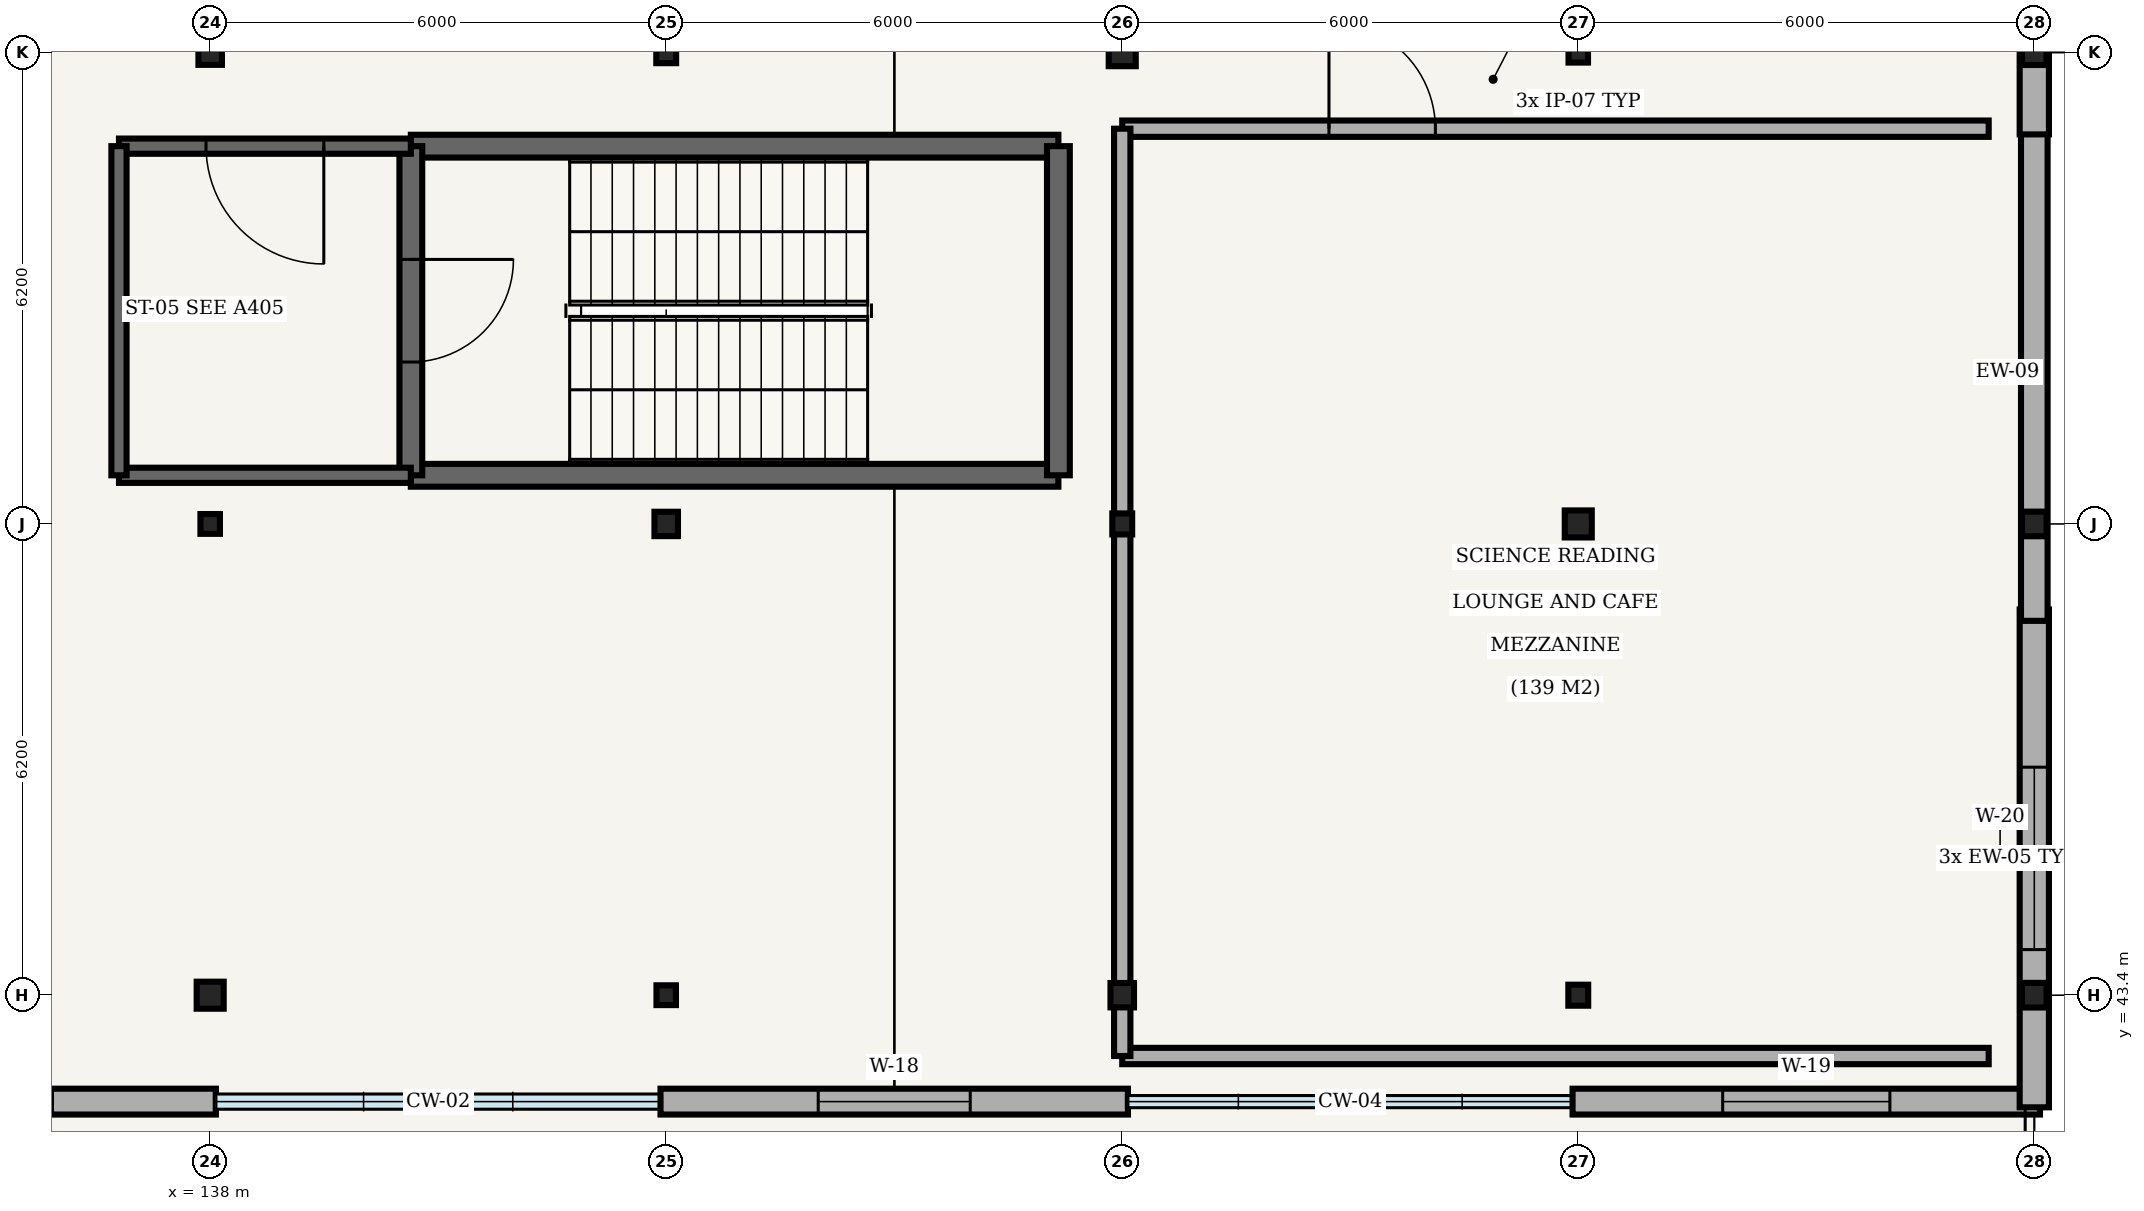
"""IFC4 building model, lengths in metres.
Left out: names, types, materials, properties, quantities, classifications, styles, units other than length and angle.
Written with IfcOpenShell. Run it as: python <this file> out.ifc"""

import sys

from ifc_helpers import new_model, si_unit, direction, frame, frame_2d, origin, origin_2d, place, context, subcontext, project, spatial, rectangle, hollow_circle, i_section, extrude, element, fill, save


model = new_model("IFC4")
c1 = context("Model", 3, precision=1e-05, world=origin(), true_north=direction((0.0, 1.0)))
c2 = subcontext(c1, "Body", "Model", "MODEL_VIEW")
j1 = project(units=[si_unit("LENGTHUNIT", "METRE"), si_unit("PLANEANGLEUNIT", "RADIAN")], contexts=[c1])
p1 = place(None, origin())
s1 = spatial("IfcSite", under=j1, at=p1, CompositionType="ELEMENT")
p2 = place(p1, origin())
s2 = spatial("IfcBuilding", under=s1, at=p2, CompositionType="ELEMENT")
p3 = place(p2, frame((0.0, 0.0, 5.4)))
s3 = spatial("IfcBuildingStorey", under=s2, at=p3, CompositionType="ELEMENT", Elevation=5.4)
p4 = place(p3, frame((138.0, 43.4, 0.0), z_axis=(0.0, 0.0, 1.0), x_axis=(1.0, 0.0, 0.0)))
e1 = element("IfcColumn", 1, at=p4, inside=s3, PredefinedType="COLUMN", context=c2, shape_type="SweptSolid", body=[
    extrude(hollow_circle(Radius=0.178, WallThickness=0.012, at=origin_2d()), origin(), (0.0, 0.0, 1.0), 5.4),
])
p5 = place(p3, frame((138.0, 49.6, 0.0), z_axis=(0.0, 0.0, 1.0), x_axis=(1.0, 0.0, 0.0)))
e2 = element("IfcColumn", 2, at=p5, inside=s3, PredefinedType="COLUMN", context=c2, shape_type="SweptSolid", body=[
    extrude(i_section(OverallWidth=0.256, OverallDepth=0.26, WebThickness=0.01, FlangeThickness=0.017, FilletRadius=0.013, at=origin_2d()), origin(), (0.0, 0.0, 1.0), 5.4),
])
p6 = place(p3, frame((138.0, 55.8, 0.0), z_axis=(0.0, 0.0, 1.0), x_axis=(1.0, 0.0, 0.0)))
e3 = element("IfcColumn", 3, at=p6, inside=s3, PredefinedType="COLUMN", context=c2, shape_type="SweptSolid", body=[
    extrude(i_section(OverallWidth=0.309, OverallDepth=0.321, WebThickness=0.014, FlangeThickness=0.022, FilletRadius=0.015, at=origin_2d()), origin(), (0.0, 0.0, 1.0), 5.4),
])
p7 = place(p3, frame((144.0, 43.4, 0.0), z_axis=(0.0, 0.0, 1.0), x_axis=(1.0, 0.0, 0.0)))
e4 = element("IfcColumn", 4, at=p7, inside=s3, PredefinedType="COLUMN", context=c2, shape_type="SweptSolid", body=[
    extrude(i_section(OverallWidth=0.256, OverallDepth=0.26, WebThickness=0.01, FlangeThickness=0.017, FilletRadius=0.013, at=origin_2d()), origin(), (0.0, 0.0, 1.0), 5.4),
])
p8 = place(p3, frame((144.0, 49.6, 0.0), z_axis=(0.0, 0.0, 1.0), x_axis=(1.0, 0.0, 0.0)))
e5 = element("IfcColumn", 5, at=p8, inside=s3, PredefinedType="COLUMN", context=c2, shape_type="SweptSolid", body=[
    extrude(i_section(OverallWidth=0.309, OverallDepth=0.321, WebThickness=0.014, FlangeThickness=0.022, FilletRadius=0.015, at=origin_2d()), origin(), (0.0, 0.0, 1.0), 5.4),
])
p9 = place(p3, frame((144.0, 55.8, 0.0), z_axis=(0.0, 0.0, 1.0), x_axis=(1.0, 0.0, 0.0)))
e6 = element("IfcColumn", 6, at=p9, inside=s3, PredefinedType="COLUMN", context=c2, shape_type="SweptSolid", body=[
    extrude(i_section(OverallWidth=0.261, OverallDepth=0.276, WebThickness=0.015, FlangeThickness=0.025, FilletRadius=0.013, at=origin_2d()), origin(), (0.0, 0.0, 1.0), 5.4),
])
p10 = place(p3, frame((150.0, 43.4, 0.0), z_axis=(0.0, 0.0, 1.0), x_axis=(1.0, 0.0, 0.0)))
e7 = element("IfcColumn", 7, at=p10, inside=s3, PredefinedType="COLUMN", context=c2, shape_type="SweptSolid", body=[
    extrude(i_section(OverallWidth=0.309, OverallDepth=0.321, WebThickness=0.014, FlangeThickness=0.022, FilletRadius=0.015, at=origin_2d()), origin(), (0.0, 0.0, 1.0), 5.4),
])
p11 = place(p3, frame((150.0, 49.6, 0.0), z_axis=(0.0, 0.0, 1.0), x_axis=(1.0, 0.0, 0.0)))
e8 = element("IfcColumn", 8, at=p11, inside=s3, PredefinedType="COLUMN", context=c2, shape_type="SweptSolid", body=[
    extrude(i_section(OverallWidth=0.261, OverallDepth=0.276, WebThickness=0.015, FlangeThickness=0.025, FilletRadius=0.013, at=origin_2d()), origin(), (0.0, 0.0, 1.0), 5.4),
])
p12 = place(p3, frame((150.0, 55.8, 0.0), z_axis=(0.0, 0.0, 1.0), x_axis=(1.0, 0.0, 0.0)))
e9 = element("IfcColumn", 9, at=p12, inside=s3, PredefinedType="COLUMN", context=c2, shape_type="SweptSolid", body=[
    extrude(hollow_circle(Radius=0.178, WallThickness=0.012, at=origin_2d()), origin(), (0.0, 0.0, 1.0), 5.4),
])
p13 = place(p3, frame((156.0, 43.4, 0.0), z_axis=(0.0, 0.0, 1.0), x_axis=(1.0, 0.0, 0.0)))
e10 = element("IfcColumn", 10, at=p13, inside=s3, PredefinedType="COLUMN", context=c2, shape_type="SweptSolid", body=[
    extrude(i_section(OverallWidth=0.261, OverallDepth=0.276, WebThickness=0.015, FlangeThickness=0.025, FilletRadius=0.013, at=origin_2d()), origin(), (0.0, 0.0, 1.0), 5.4),
])
p14 = place(p3, frame((156.0, 49.6, 0.0), z_axis=(0.0, 0.0, 1.0), x_axis=(1.0, 0.0, 0.0)))
e11 = element("IfcColumn", 11, at=p14, inside=s3, PredefinedType="COLUMN", context=c2, shape_type="SweptSolid", body=[
    extrude(hollow_circle(Radius=0.178, WallThickness=0.012, at=origin_2d()), origin(), (0.0, 0.0, 1.0), 5.4),
])
p15 = place(p3, frame((156.0, 55.8, 0.0), z_axis=(0.0, 0.0, 1.0), x_axis=(1.0, 0.0, 0.0)))
e12 = element("IfcColumn", 12, at=p15, inside=s3, PredefinedType="COLUMN", context=c2, shape_type="SweptSolid", body=[
    extrude(i_section(OverallWidth=0.256, OverallDepth=0.26, WebThickness=0.01, FlangeThickness=0.017, FilletRadius=0.013, at=origin_2d()), origin(), (0.0, 0.0, 1.0), 5.4),
])
for number, where, z_axis, x_axis in (
    (13, (162.0, 43.4, 0.0), (0.0, 0.0, 1.0), (1.0, 0.0, 0.0)),
    (14, (162.0, 49.6, 0.0), (0.0, 0.0, 1.0), (1.0, 0.0, 0.0)),
    (15, (162.0, 55.8, 0.0), (0.0, 0.0, 1.0), (1.0, 0.0, 0.0)),
):
    element("IfcColumn", number, at=place(p3, frame(where, z_axis=z_axis, x_axis=x_axis)), inside=s3, PredefinedType="COLUMN", context=c2, shape_type="SweptSolid", body=[
        extrude(hollow_circle(Radius=0.162, WallThickness=0.012, at=origin_2d()), origin(), (0.0, 0.0, 1.0), 5.4),
    ])
p16 = place(p3, frame((131.925, 42.0, 0.0), z_axis=(0.0, 0.0, 1.0), x_axis=(1.0, 0.0, 0.0)))
e16 = element("IfcWall", 16, at=p16, inside=s3, PredefinedType="SOLIDWALL", context=c2, shape_type="SweptSolid", body=[
    extrude(rectangle(XDim=6.15, YDim=0.34, at=frame_2d((3.075, 0.0))), origin(), (0.0, 0.0, 1.0), 4.44),
])
p17 = place(p16, frame((2.15, 0.0, 0.9)))
e17 = element("IfcOpeningElement", 17, at=p17, cuts=e16, PredefinedType="OPENING", context=c2, shape_type="SweptSolid", body=[
    extrude(rectangle(XDim=1.85, YDim=1.5, at=frame_2d((0.925, 0.75))), frame((0.0, 0.18, 0.0), z_axis=(0.0, -1.0, 0.0), x_axis=(1.0, 0.0, 0.0)), (0.0, 0.0, 1.0), 0.36),
])
p18 = place(p3, frame((143.925, 42.0, 0.0), z_axis=(0.0, 0.0, 1.0), x_axis=(1.0, 0.0, 0.0)))
e18 = element("IfcWall", 18, at=p18, inside=s3, PredefinedType="SOLIDWALL", context=c2, shape_type="SweptSolid", body=[
    extrude(rectangle(XDim=6.15, YDim=0.34, at=frame_2d((3.075, 0.0))), origin(), (0.0, 0.0, 1.0), 4.44),
])
p19 = place(p18, frame((2.075, 0.0, 0.9)))
e19 = element("IfcOpeningElement", 19, at=p19, cuts=e18, PredefinedType="OPENING", context=c2, shape_type="SweptSolid", body=[
    extrude(rectangle(XDim=2.0, YDim=1.5, at=frame_2d((1.0, 0.75))), frame((0.0, 0.18, 0.0), z_axis=(0.0, -1.0, 0.0), x_axis=(1.0, 0.0, 0.0)), (0.0, 0.0, 1.0), 0.36),
])
p20 = place(p3, frame((155.925, 42.0, 0.0), z_axis=(0.0, 0.0, 1.0), x_axis=(1.0, 0.0, 0.0)))
e20 = element("IfcWall", 20, at=p20, inside=s3, PredefinedType="SOLIDWALL", context=c2, shape_type="SweptSolid", body=[
    extrude(rectangle(XDim=6.15, YDim=0.34, at=frame_2d((3.075, 0.0))), origin(), (0.0, 0.0, 1.0), 4.44),
])
p21 = place(p20, frame((1.975, 0.0, 0.9)))
e21 = element("IfcOpeningElement", 21, at=p21, cuts=e20, PredefinedType="OPENING", context=c2, shape_type="SweptSolid", body=[
    extrude(rectangle(XDim=2.2, YDim=1.5, at=frame_2d((1.1, 0.75))), frame((0.0, 0.18, 0.0), z_axis=(0.0, -1.0, 0.0), x_axis=(1.0, 0.0, 0.0)), (0.0, 0.0, 1.0), 0.36),
])
p22 = place(p3, frame((162.0, 41.925, 0.0), z_axis=(0.0, 0.0, 1.0), x_axis=(0.0, 1.0, 0.0)))
e22 = element("IfcWall", 22, at=p22, inside=s3, PredefinedType="SOLIDWALL", context=c2, shape_type="SweptSolid", body=[
    extrude(rectangle(XDim=6.55, YDim=0.385, at=frame_2d((3.275, 0.0))), origin(), (0.0, 0.0, 1.0), 4.44),
])
p23 = place(p22, frame((2.075, 0.0, 0.9)))
e23 = element("IfcOpeningElement", 23, at=p23, cuts=e22, PredefinedType="OPENING", context=c2, shape_type="SweptSolid", body=[
    extrude(rectangle(XDim=2.4, YDim=1.5, at=frame_2d((1.2, 0.75))), frame((0.0, 0.202, 0.0), z_axis=(0.0, -1.0, 0.0), x_axis=(1.0, 0.0, 0.0)), (0.0, 0.0, 1.0), 0.405),
])
p24 = place(p3, frame((162.0, 48.325, 0.0), z_axis=(0.0, 0.0, 1.0), x_axis=(0.0, 1.0, 0.0)))
e24 = element("IfcWall", 24, at=p24, inside=s3, PredefinedType="SOLIDWALL", context=c2, shape_type="SweptSolid", body=[
    extrude(rectangle(XDim=6.55, YDim=0.35, at=frame_2d((3.275, 0.0))), origin(), (0.0, 0.0, 1.0), 4.44),
])
p25 = place(p3, frame((162.0, 54.725, 0.0), z_axis=(0.0, 0.0, 1.0), x_axis=(0.0, 1.0, 0.0)))
e25 = element("IfcWall", 25, at=p25, inside=s3, PredefinedType="SOLIDWALL", context=c2, shape_type="SweptSolid", body=[
    extrude(rectangle(XDim=6.55, YDim=0.385, at=frame_2d((3.275, 0.0))), origin(), (0.0, 0.0, 1.0), 4.44),
])
p26 = place(p25, frame((1.975, 0.0, 0.9)))
e26 = element("IfcOpeningElement", 26, at=p26, cuts=e25, PredefinedType="OPENING", context=c2, shape_type="SweptSolid", body=[
    extrude(rectangle(XDim=2.6, YDim=1.5, at=frame_2d((1.3, 0.75))), frame((0.0, 0.202, 0.0), z_axis=(0.0, -1.0, 0.0), x_axis=(1.0, 0.0, 0.0)), (0.0, 0.0, 1.0), 0.405),
])
for number, where, z_axis, x_axis in (
    (27, (140.64, 50.24, 0.0), (0.0, 0.0, 1.0), (1.0, 0.0, 0.0)),
    (28, (149.16, 54.57, 0.0), (0.0, 0.0, 1.0), (-1.0, 0.0, 0.0)),
):
    element("IfcWall", number, at=place(p3, frame(where, z_axis=z_axis, x_axis=x_axis)), inside=s3, PredefinedType="SHEAR", context=c2, shape_type="SweptSolid", body=[
        extrude(rectangle(XDim=8.52, YDim=0.3, at=frame_2d((4.26, 0.0))), origin(), (0.0, 0.0, 1.0), 5.15),
    ])
p27 = place(p3, frame((140.64, 54.57, 0.0), z_axis=(0.0, 0.0, 1.0), x_axis=(0.0, -1.0, 0.0)))
e29 = element("IfcWall", 29, at=p27, inside=s3, PredefinedType="SHEAR", context=c2, shape_type="SweptSolid", body=[
    extrude(rectangle(XDim=4.33, YDim=0.3, at=frame_2d((2.165, 0.0))), origin(), (0.0, 0.0, 1.0), 5.15),
])
p28 = place(p27, frame((1.49, 0.0, 0.0)))
e30 = element("IfcOpeningElement", 30, at=p28, cuts=e29, PredefinedType="OPENING", context=c2, shape_type="SweptSolid", body=[
    extrude(rectangle(XDim=1.35, YDim=2.2, at=frame_2d((0.675, 1.1))), frame((0.0, 0.16, 0.0), z_axis=(0.0, -1.0, 0.0), x_axis=(1.0, 0.0, 0.0)), (0.0, 0.0, 1.0), 0.32),
])
p29 = place(p3, frame((149.16, 50.24, 0.0), z_axis=(0.0, 0.0, 1.0), x_axis=(0.0, 1.0, 0.0)))
e31 = element("IfcWall", 31, at=p29, inside=s3, PredefinedType="SHEAR", context=c2, shape_type="SweptSolid", body=[
    extrude(rectangle(XDim=4.33, YDim=0.3, at=frame_2d((2.165, 0.0))), origin(), (0.0, 0.0, 1.0), 5.15),
])
p30 = place(p3, frame((136.8, 50.24, 0.0), z_axis=(0.0, 0.0, 1.0), x_axis=(1.0, 0.0, 0.0)))
e32 = element("IfcWall", 32, at=p30, inside=s3, PredefinedType="SHEAR", context=c2, shape_type="SweptSolid", body=[
    extrude(rectangle(XDim=3.84, YDim=0.2, at=frame_2d((1.92, 0.0))), origin(), (0.0, 0.0, 1.0), 5.15),
])
p31 = place(p3, frame((140.64, 54.57, 0.0), z_axis=(0.0, 0.0, 1.0), x_axis=(-1.0, 0.0, 0.0)))
e33 = element("IfcWall", 33, at=p31, inside=s3, PredefinedType="SHEAR", context=c2, shape_type="SweptSolid", body=[
    extrude(rectangle(XDim=3.84, YDim=0.2, at=frame_2d((1.92, 0.0))), origin(), (0.0, 0.0, 1.0), 5.15),
])
p32 = place(p31, frame((1.145, 0.0, 0.0)))
e34 = element("IfcOpeningElement", 34, at=p32, cuts=e33, PredefinedType="OPENING", context=c2, shape_type="SweptSolid", body=[
    extrude(rectangle(XDim=1.55, YDim=2.2, at=frame_2d((0.775, 1.1))), frame((0.0, 0.11, 0.0), z_axis=(0.0, -1.0, 0.0), x_axis=(1.0, 0.0, 0.0)), (0.0, 0.0, 1.0), 0.22),
])
p33 = place(p3, frame((136.8, 54.57, 0.0), z_axis=(0.0, 0.0, 1.0), x_axis=(0.0, -1.0, 0.0)))
e35 = element("IfcWall", 35, at=p33, inside=s3, PredefinedType="SHEAR", context=c2, shape_type="SweptSolid", body=[
    extrude(rectangle(XDim=4.33, YDim=0.2, at=frame_2d((2.165, 0.0))), origin(), (0.0, 0.0, 1.0), 5.15),
])
p34 = place(p3, frame((150.0, 54.8, 0.0), z_axis=(0.0, 0.0, 1.0), x_axis=(1.0, 0.0, 0.0)))
e36 = element("IfcWall", 36, at=p34, inside=s3, PredefinedType="PARTITIONING", context=c2, shape_type="SweptSolid", body=[
    extrude(rectangle(XDim=11.4, YDim=0.215, at=frame_2d((5.7, 0.0))), origin(), (0.0, 0.0, 1.0), 4.35),
])
p35 = place(p34, frame((2.72, 0.0, 0.0)))
e37 = element("IfcOpeningElement", 37, at=p35, cuts=e36, PredefinedType="OPENING", context=c2, shape_type="SweptSolid", body=[
    extrude(rectangle(XDim=1.4, YDim=2.25, at=frame_2d((0.7, 1.125))), frame((0.0, 0.117, 0.0), z_axis=(0.0, -1.0, 0.0), x_axis=(1.0, 0.0, 0.0)), (0.0, 0.0, 1.0), 0.235),
])
p36 = place(p3, frame((161.4, 42.6, 0.0), z_axis=(0.0, 0.0, 1.0), x_axis=(-1.0, 0.0, 0.0)))
e38 = element("IfcWall", 38, at=p36, inside=s3, PredefinedType="PARTITIONING", context=c2, shape_type="SweptSolid", body=[
    extrude(rectangle(XDim=11.4, YDim=0.215, at=frame_2d((5.7, 0.0))), origin(), (0.0, 0.0, 1.0), 4.35),
])
p37 = place(p3, frame((150.0, 42.6, 0.0), z_axis=(0.0, 0.0, 1.0), x_axis=(0.0, 1.0, 0.0)))
e39 = element("IfcWall", 39, at=p37, inside=s3, PredefinedType="PARTITIONING", context=c2, shape_type="SweptSolid", body=[
    extrude(rectangle(XDim=12.2, YDim=0.215, at=frame_2d((6.1, 0.0))), origin(), (0.0, 0.0, 1.0), 4.35),
])
p38 = place(p17, origin())
e40 = element("IfcWindow", 40, at=p38, inside=s3, PartitioningType="DOUBLE_PANEL_VERTICAL", PredefinedType="WINDOW", context=c2, shape_type="SweptSolid", body=[
    extrude(rectangle(XDim=1.85, YDim=1.5, at=frame_2d((0.925, 0.75))), frame((0.0, 0.03, 0.0), z_axis=(0.0, -1.0, 0.0), x_axis=(1.0, 0.0, 0.0)), (0.0, 0.0, 1.0), 0.06),
])
fill(e17, e40)
p39 = place(p19, origin())
e41 = element("IfcWindow", 41, at=p39, inside=s3, PartitioningType="DOUBLE_PANEL_VERTICAL", PredefinedType="WINDOW", context=c2, shape_type="SweptSolid", body=[
    extrude(rectangle(XDim=2.0, YDim=1.5, at=frame_2d((1.0, 0.75))), frame((0.0, 0.03, 0.0), z_axis=(0.0, -1.0, 0.0), x_axis=(1.0, 0.0, 0.0)), (0.0, 0.0, 1.0), 0.06),
])
fill(e19, e41)
p40 = place(p21, origin())
e42 = element("IfcWindow", 42, at=p40, inside=s3, PartitioningType="DOUBLE_PANEL_VERTICAL", PredefinedType="WINDOW", context=c2, shape_type="SweptSolid", body=[
    extrude(rectangle(XDim=2.2, YDim=1.5, at=frame_2d((1.1, 0.75))), frame((0.0, 0.03, 0.0), z_axis=(0.0, -1.0, 0.0), x_axis=(1.0, 0.0, 0.0)), (0.0, 0.0, 1.0), 0.06),
])
fill(e21, e42)
p41 = place(p23, origin())
e43 = element("IfcWindow", 43, at=p41, inside=s3, PartitioningType="DOUBLE_PANEL_VERTICAL", PredefinedType="WINDOW", context=c2, shape_type="SweptSolid", body=[
    extrude(rectangle(XDim=2.4, YDim=1.5, at=frame_2d((1.2, 0.75))), frame((0.0, 0.03, 0.0), z_axis=(0.0, -1.0, 0.0), x_axis=(1.0, 0.0, 0.0)), (0.0, 0.0, 1.0), 0.06),
])
fill(e23, e43)
p42 = place(p28, origin())
e44 = element("IfcDoor", 44, at=p42, inside=s3, OperationType="SINGLE_SWING_LEFT", PredefinedType="DOOR", context=c2, shape_type="SweptSolid", body=[
    extrude(rectangle(XDim=1.35, YDim=2.2, at=frame_2d((0.675, 1.1))), frame((0.0, 0.025, 0.0), z_axis=(0.0, -1.0, 0.0), x_axis=(1.0, 0.0, 0.0)), (0.0, 0.0, 1.0), 0.05),
])
fill(e30, e44)
p43 = place(p32, origin())
e45 = element("IfcDoor", 45, at=p43, inside=s3, OperationType="SINGLE_SWING_LEFT", PredefinedType="DOOR", context=c2, shape_type="SweptSolid", body=[
    extrude(rectangle(XDim=1.55, YDim=2.2, at=frame_2d((0.775, 1.1))), frame((0.0, 0.025, 0.0), z_axis=(0.0, -1.0, 0.0), x_axis=(1.0, 0.0, 0.0)), (0.0, 0.0, 1.0), 0.05),
])
fill(e34, e45)
p44 = place(p35, origin())
e46 = element("IfcDoor", 46, at=p44, inside=s3, OperationType="SINGLE_SWING_LEFT", PredefinedType="DOOR", context=c2, shape_type="SweptSolid", body=[
    extrude(rectangle(XDim=1.4, YDim=2.25, at=frame_2d((0.7, 1.125))), frame((0.0, 0.025, 0.0), z_axis=(0.0, -1.0, 0.0), x_axis=(1.0, 0.0, 0.0)), (0.0, 0.0, 1.0), 0.05),
])
fill(e37, e46)
save(model, sys.argv[1])
